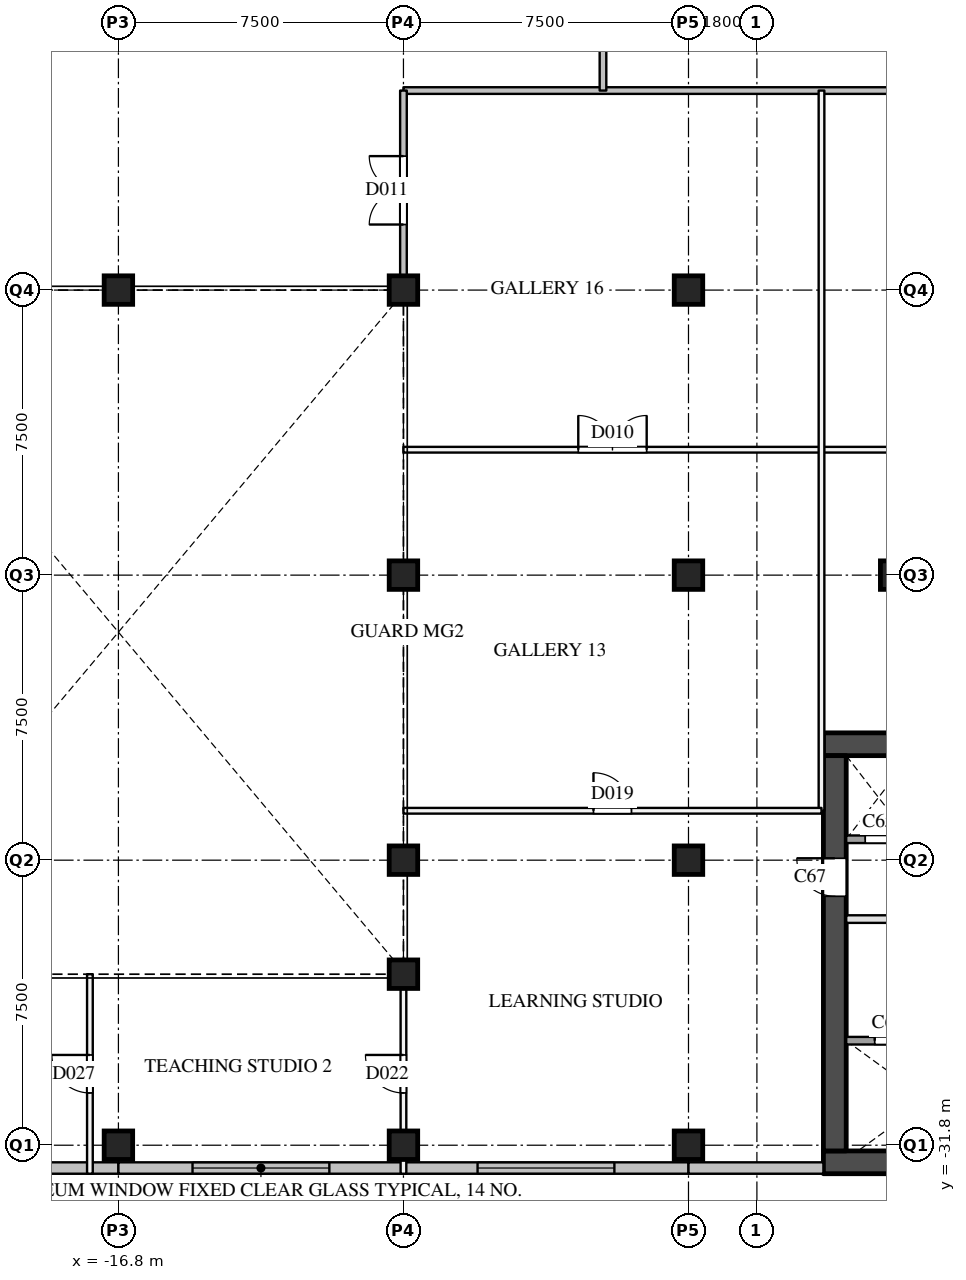
"""IFC4 building model, lengths in metres.
Left out: names, types, materials, properties, quantities, classifications, styles, units other than length and angle.
Written with IfcOpenShell. Run it as: python <this file> out.ifc"""

import sys

from ifc_helpers import new_model, si_unit, direction, frame, frame_2d, origin, origin_2d, place, context, subcontext, project, spatial, rectangle, extrude, element, fill, save


model = new_model("IFC4")
c1 = context("Model", 3, precision=1e-05, world=origin(), true_north=direction((0.0, 1.0)))
c2 = subcontext(c1, "Body", "Model", "MODEL_VIEW")
j1 = project(units=[si_unit("LENGTHUNIT", "METRE"), si_unit("PLANEANGLEUNIT", "RADIAN")], contexts=[c1])
p1 = place(None, origin())
s1 = spatial("IfcSite", under=j1, at=p1, CompositionType="ELEMENT")
p2 = place(p1, origin())
s2 = spatial("IfcBuilding", under=s1, at=p2, CompositionType="ELEMENT")
p3 = place(p2, frame((0.0, 0.0, 14.0)))
s3 = spatial("IfcBuildingStorey", under=s2, at=p3, CompositionType="ELEMENT", Elevation=14.0)
for number, where, z_axis, x_axis in (
    (1, (-16.8, -31.8, 0.0), (0.0, 0.0, 1.0), (1.0, 0.0, 0.0)),
    (2, (-16.8, -9.3, 0.0), (0.0, 0.0, 1.0), (1.0, 0.0, 0.0)),
    (3, (-9.3, -31.8, 0.0), (0.0, 0.0, 1.0), (1.0, 0.0, 0.0)),
    (4, (-9.3, -24.3, 0.0), (0.0, 0.0, 1.0), (1.0, 0.0, 0.0)),
    (5, (-9.3, -16.8, 0.0), (0.0, 0.0, 1.0), (1.0, 0.0, 0.0)),
    (6, (-9.3, -9.3, 0.0), (0.0, 0.0, 1.0), (1.0, 0.0, 0.0)),
    (7, (-1.8, -31.8, 0.0), (0.0, 0.0, 1.0), (1.0, 0.0, 0.0)),
):
    element("IfcColumn", number, at=place(p3, frame(where, z_axis=z_axis, x_axis=x_axis)), inside=s3, PredefinedType="COLUMN", context=c2, shape_type="SweptSolid", body=[
        extrude(rectangle(XDim=0.75, YDim=0.75, at=origin_2d()), origin(), (0.0, 0.0, 1.0), 7.0),
    ])
for number, where, z_axis, x_axis in (
    (8, (-1.8, -24.3, -0.41), (0.0, 0.0, 1.0), (1.0, 0.0, 0.0)),
    (9, (-1.8, -16.8, -0.41), (0.0, 0.0, 1.0), (1.0, 0.0, 0.0)),
    (10, (-1.8, -9.3, -0.41), (0.0, 0.0, 1.0), (1.0, 0.0, 0.0)),
):
    element("IfcColumn", number, at=place(p3, frame(where, z_axis=z_axis, x_axis=x_axis)), inside=s3, PredefinedType="COLUMN", context=c2, shape_type="SweptSolid", body=[
        extrude(rectangle(XDim=0.75, YDim=0.75, at=origin_2d()), origin(), (0.0, 0.0, 1.0), 7.41),
    ])
for number, where, z_axis, x_axis in (
    (11, (-9.3, -27.3, 0.0), (0.0, 0.0, 1.0), (1.0, 0.0, 0.0)),
    (12, (3.625, -16.8, 0.0), (0.0, 0.0, 1.0), (1.0, 0.0, 0.0)),
):
    element("IfcColumn", number, at=place(p3, frame(where, z_axis=z_axis, x_axis=x_axis)), inside=s3, PredefinedType="COLUMN", context=c2, shape_type="SweptSolid", body=[
        extrude(rectangle(XDim=0.75, YDim=0.75, at=origin_2d()), origin(), (0.0, 0.0, 1.0), 7.0),
    ])
p4 = place(p3, frame((-20.35, -32.4, 0.0), z_axis=(0.0, 0.0, 1.0), x_axis=(1.0, 0.0, 0.0)))
e13 = element("IfcWall", 13, at=p4, inside=s3, PredefinedType="SOLIDWALL", context=c2, shape_type="SweptSolid", body=[
    extrude(rectangle(XDim=3.55, YDim=0.3, at=frame_2d((1.775, 0.0))), origin(), (0.0, 0.0, 1.0), 6.59),
])
p5 = place(p3, frame((-16.8, -32.4, 0.0), z_axis=(0.0, 0.0, 1.0), x_axis=(1.0, 0.0, 0.0)))
e14 = element("IfcWall", 14, at=p5, inside=s3, PredefinedType="SOLIDWALL", context=c2, shape_type="SweptSolid", body=[
    extrude(rectangle(XDim=7.5, YDim=0.3, at=frame_2d((3.75, 0.0))), origin(), (0.0, 0.0, 1.0), 6.59),
])
p6 = place(p5, frame((1.95, 0.0, 0.9)))
e15 = element("IfcOpeningElement", 15, at=p6, cuts=e14, PredefinedType="OPENING", context=c2, shape_type="SweptSolid", body=[
    extrude(rectangle(XDim=3.6, YDim=3.0, at=frame_2d((1.8, 1.5))), frame((0.0, 0.16, 0.0), z_axis=(0.0, -1.0, 0.0), x_axis=(1.0, 0.0, 0.0)), (0.0, 0.0, 1.0), 0.32),
])
p7 = place(p3, frame((-9.3, -32.4, 0.0), z_axis=(0.0, 0.0, 1.0), x_axis=(1.0, 0.0, 0.0)))
e16 = element("IfcWall", 16, at=p7, inside=s3, PredefinedType="SOLIDWALL", context=c2, shape_type="SweptSolid", body=[
    extrude(rectangle(XDim=7.5, YDim=0.3, at=frame_2d((3.75, 0.0))), origin(), (0.0, 0.0, 1.0), 6.59),
])
p8 = place(p7, frame((1.95, 0.0, 0.9)))
e17 = element("IfcOpeningElement", 17, at=p8, cuts=e16, PredefinedType="OPENING", context=c2, shape_type="SweptSolid", body=[
    extrude(rectangle(XDim=3.6, YDim=3.0, at=frame_2d((1.8, 1.5))), frame((0.0, 0.16, 0.0), z_axis=(0.0, -1.0, 0.0), x_axis=(1.0, 0.0, 0.0)), (0.0, 0.0, 1.0), 0.32),
])
p9 = place(p3, frame((-1.8, -32.4, 0.0), z_axis=(0.0, 0.0, 1.0), x_axis=(1.0, 0.0, 0.0)))
e18 = element("IfcWall", 18, at=p9, inside=s3, PredefinedType="SOLIDWALL", context=c2, shape_type="SweptSolid", body=[
    extrude(rectangle(XDim=3.55, YDim=0.3, at=frame_2d((1.775, 0.0))), origin(), (0.0, 0.0, 1.0), 6.59),
])
for number, where, z_axis, x_axis in (
    (19, (1.75, -32.25, 0.0), (0.0, 0.0, 1.0), (1.0, 0.0, 0.0)),
    (20, (1.75, -21.25, 0.0), (0.0, 0.0, 1.0), (1.0, 0.0, 0.0)),
):
    element("IfcWall", number, at=place(p3, frame(where, z_axis=z_axis, x_axis=x_axis)), inside=s3, PredefinedType="SHEAR", context=c2, shape_type="SweptSolid", body=[
        extrude(rectangle(XDim=12.2, YDim=0.6, at=frame_2d((6.1, 0.0))), origin(), (0.0, 0.0, 1.0), 6.59),
    ])
p10 = place(p3, frame((2.05, -31.95, 0.0), z_axis=(0.0, 0.0, 1.0), x_axis=(0.0, 1.0, 0.0)))
e21 = element("IfcWall", 21, at=p10, inside=s3, PredefinedType="SHEAR", context=c2, shape_type="SweptSolid", body=[
    extrude(rectangle(XDim=10.4, YDim=0.6, at=frame_2d((5.2, 0.0))), origin(), (0.0, 0.0, 1.0), 6.59),
])
p11 = place(p10, frame((6.7, 0.0, 0.0)))
e22 = element("IfcOpeningElement", 22, at=p11, cuts=e21, PredefinedType="OPENING", context=c2, shape_type="SweptSolid", body=[
    extrude(rectangle(XDim=1.0, YDim=2.1, at=frame_2d((0.5, 1.05))), frame((0.0, 0.31, 0.0), z_axis=(0.0, -1.0, 0.0), x_axis=(1.0, 0.0, 0.0)), (0.0, 0.0, 1.0), 0.62),
])
p12 = place(p3, frame((2.35, -29.05, 0.0), z_axis=(0.0, 0.0, 1.0), x_axis=(1.0, 0.0, 0.0)))
e23 = element("IfcWall", 23, at=p12, inside=s3, PredefinedType="SOLIDWALL", context=c2, shape_type="SweptSolid", body=[
    extrude(rectangle(XDim=4.3, YDim=0.2, at=frame_2d((2.15, 0.0))), origin(), (0.0, 0.0, 1.0), 6.59),
])
p13 = place(p12, frame((2.65, 0.0, 0.0)))
e24 = element("IfcOpeningElement", 24, at=p13, cuts=e23, PredefinedType="OPENING", context=c2, shape_type="SweptSolid", body=[
    extrude(rectangle(XDim=1.2, YDim=2.1, at=frame_2d((0.6, 1.05))), frame((0.0, 0.11, 0.0), z_axis=(0.0, -1.0, 0.0), x_axis=(1.0, 0.0, 0.0)), (0.0, 0.0, 1.0), 0.22),
])
p14 = place(p12, frame((0.75, 0.0, 0.0)))
e25 = element("IfcOpeningElement", 25, at=p14, cuts=e23, PredefinedType="OPENING", context=c2, shape_type="SweptSolid", body=[
    extrude(rectangle(XDim=0.7, YDim=2.1, at=frame_2d((0.35, 1.05))), frame((0.0, 0.11, 0.0), z_axis=(0.0, -1.0, 0.0), x_axis=(1.0, 0.0, 0.0)), (0.0, 0.0, 1.0), 0.22),
])
p15 = place(p3, frame((2.35, -25.85, 0.0), z_axis=(0.0, 0.0, 1.0), x_axis=(1.0, 0.0, 0.0)))
e26 = element("IfcWall", 26, at=p15, inside=s3, PredefinedType="PARTITIONING", context=c2, shape_type="SweptSolid", body=[
    extrude(rectangle(XDim=4.3, YDim=0.2, at=frame_2d((2.15, 0.0))), origin(), (0.0, 0.0, 1.0), 6.59),
])
p16 = place(p15, frame((1.15, 0.0, 0.0)))
e27 = element("IfcOpeningElement", 27, at=p16, cuts=e26, PredefinedType="OPENING", context=c2, shape_type="SweptSolid", body=[
    extrude(rectangle(XDim=1.8, YDim=2.1, at=frame_2d((0.9, 1.05))), frame((0.0, 0.11, 0.0), z_axis=(0.0, -1.0, 0.0), x_axis=(1.0, 0.0, 0.0)), (0.0, 0.0, 1.0), 0.22),
])
p17 = place(p3, frame((2.35, -23.75, 0.0), z_axis=(0.0, 0.0, 1.0), x_axis=(1.0, 0.0, 0.0)))
e28 = element("IfcWall", 28, at=p17, inside=s3, PredefinedType="SOLIDWALL", context=c2, shape_type="SweptSolid", body=[
    extrude(rectangle(XDim=1.7, YDim=0.2, at=frame_2d((0.85, 0.0))), origin(), (0.0, 0.0, 1.0), 6.59),
])
p18 = place(p17, frame((0.5, 0.0, 0.0)))
e29 = element("IfcOpeningElement", 29, at=p18, cuts=e28, PredefinedType="OPENING", context=c2, shape_type="SweptSolid", body=[
    extrude(rectangle(XDim=0.7, YDim=2.1, at=frame_2d((0.35, 1.05))), frame((0.0, 0.11, 0.0), z_axis=(0.0, -1.0, 0.0), x_axis=(1.0, 0.0, 0.0)), (0.0, 0.0, 1.0), 0.22),
])
p19 = place(p3, frame((-9.3, -4.05, 0.0), z_axis=(0.0, 0.0, 1.0), x_axis=(1.0, 0.0, 0.0)))
e30 = element("IfcWall", 30, at=p19, inside=s3, PredefinedType="PARTITIONING", context=c2, shape_type="SweptSolid", body=[
    extrude(rectangle(XDim=23.25, YDim=0.175, at=frame_2d((11.625, 0.0))), origin(), (0.0, 0.0, 1.0), 5.79),
])
p20 = place(p19, frame((16.225, 0.0, 0.0)))
e31 = element("IfcOpeningElement", 31, at=p20, cuts=e30, PredefinedType="OPENING", context=c2, shape_type="SweptSolid", body=[
    extrude(rectangle(XDim=1.8, YDim=2.1, at=frame_2d((0.9, 1.05))), frame((0.0, 0.097, 0.0), z_axis=(0.0, -1.0, 0.0), x_axis=(1.0, 0.0, 0.0)), (0.0, 0.0, 1.0), 0.195),
])
p21 = place(p3, frame((-9.3, -9.3, 0.0), z_axis=(0.0, 0.0, 1.0), x_axis=(0.0, 1.0, 0.0)))
e32 = element("IfcWall", 32, at=p21, inside=s3, PredefinedType="PARTITIONING", context=c2, shape_type="SweptSolid", body=[
    extrude(rectangle(XDim=5.25, YDim=0.175, at=frame_2d((2.625, 0.0))), origin(), (0.0, 0.0, 1.0), 5.79),
])
p22 = place(p21, frame((1.725, 0.0, 0.0)))
e33 = element("IfcOpeningElement", 33, at=p22, cuts=e32, PredefinedType="OPENING", context=c2, shape_type="SweptSolid", body=[
    extrude(rectangle(XDim=1.8, YDim=2.1, at=frame_2d((0.9, 1.05))), frame((0.0, 0.097, 0.0), z_axis=(0.0, -1.0, 0.0), x_axis=(1.0, 0.0, 0.0)), (0.0, 0.0, 1.0), 0.195),
])
p23 = place(p3, frame((-4.05, -4.05, 0.0), z_axis=(0.0, 0.0, 1.0), x_axis=(0.0, 1.0, 0.0)))
e34 = element("IfcWall", 34, at=p23, inside=s3, PredefinedType="PARTITIONING", context=c2, shape_type="SweptSolid", body=[
    extrude(rectangle(XDim=63.0, YDim=0.175, at=frame_2d((31.5, 0.0))), origin(), (0.0, 0.0, 1.0), 5.79),
])
p24 = place(p23, frame((7.125, 0.0, 0.0)))
e35 = element("IfcOpeningElement", 35, at=p24, cuts=e34, PredefinedType="OPENING", context=c2, shape_type="SweptSolid", body=[
    extrude(rectangle(XDim=1.8, YDim=2.1, at=frame_2d((0.9, 1.05))), frame((0.0, 0.097, 0.0), z_axis=(0.0, -1.0, 0.0), x_axis=(1.0, 0.0, 0.0)), (0.0, 0.0, 1.0), 0.195),
])
p25 = place(p3, frame((1.7, -23.0, 0.0), z_axis=(0.0, 0.0, 1.0), x_axis=(1.0, 0.0, 0.0)))
e36 = element("IfcWall", 36, at=p25, inside=s3, PredefinedType="PARTITIONING", context=c2, shape_type="SweptSolid", body=[
    extrude(rectangle(XDim=0.05, YDim=0.15, at=frame_2d((0.025, 0.0))), origin(), (0.0, 0.0, 1.0), 6.59),
])
p26 = place(p3, frame((-9.3, -13.5, 0.0), z_axis=(0.0, 0.0, 1.0), x_axis=(1.0, 0.0, 0.0)))
e37 = element("IfcWall", 37, at=p26, inside=s3, PredefinedType="PARTITIONING", context=c2, shape_type="SweptSolid", body=[
    extrude(rectangle(XDim=23.25, YDim=0.15, at=frame_2d((11.625, 0.0))), origin(), (0.0, 0.0, 1.0), 5.79),
])
p27 = place(p26, frame((16.225, 0.0, 0.0)))
e38 = element("IfcOpeningElement", 38, at=p27, cuts=e37, PredefinedType="OPENING", context=c2, shape_type="SweptSolid", body=[
    extrude(rectangle(XDim=1.8, YDim=2.1, at=frame_2d((0.9, 1.05))), frame((0.0, 0.085, 0.0), z_axis=(0.0, -1.0, 0.0), x_axis=(1.0, 0.0, 0.0)), (0.0, 0.0, 1.0), 0.17),
])
p28 = place(p26, frame((4.6, 0.0, 0.0)))
e39 = element("IfcOpeningElement", 39, at=p28, cuts=e37, PredefinedType="OPENING", context=c2, shape_type="SweptSolid", body=[
    extrude(rectangle(XDim=1.8, YDim=2.1, at=frame_2d((0.9, 1.05))), frame((0.0, 0.085, 0.0), z_axis=(0.0, -1.0, 0.0), x_axis=(1.0, 0.0, 0.0)), (0.0, 0.0, 1.0), 0.17),
])
p29 = place(p3, frame((1.7, -23.0, 0.0), z_axis=(0.0, 0.0, 1.0), x_axis=(0.0, 1.0, 0.0)))
e40 = element("IfcWall", 40, at=p29, inside=s3, PredefinedType="PARTITIONING", context=c2, shape_type="SweptSolid", body=[
    extrude(rectangle(XDim=18.95, YDim=0.15, at=frame_2d((9.475, 0.0))), origin(), (0.0, 0.0, 1.0), 5.79),
])
p30 = place(p3, frame((-9.3, -23.0, 0.0), z_axis=(0.0, 0.0, 1.0), x_axis=(1.0, 0.0, 0.0)))
e41 = element("IfcWall", 41, at=p30, inside=s3, PredefinedType="PARTITIONING", context=c2, shape_type="SweptSolid", body=[
    extrude(rectangle(XDim=11.0, YDim=0.15, at=frame_2d((5.5, 0.0))), origin(), (0.0, 0.0, 1.0), 5.79),
])
p31 = place(p30, frame((5.0, 0.0, 0.0)))
e42 = element("IfcOpeningElement", 42, at=p31, cuts=e41, PredefinedType="OPENING", context=c2, shape_type="SweptSolid", body=[
    extrude(rectangle(XDim=1.0, YDim=2.1, at=frame_2d((0.5, 1.05))), frame((0.0, 0.085, 0.0), z_axis=(0.0, -1.0, 0.0), x_axis=(1.0, 0.0, 0.0)), (0.0, 0.0, 1.0), 0.17),
])
p32 = place(p3, frame((-17.55, -32.55, 0.0), z_axis=(0.0, 0.0, 1.0), x_axis=(0.0, 1.0, 0.0)))
e43 = element("IfcWall", 43, at=p32, inside=s3, PredefinedType="PARTITIONING", context=c2, shape_type="SweptSolid", body=[
    extrude(rectangle(XDim=5.25, YDim=0.15, at=frame_2d((2.625, 0.0))), origin(), (0.0, 0.0, 1.0), 6.59),
])
p33 = place(p32, frame((2.125, 0.0, 0.0)))
e44 = element("IfcOpeningElement", 44, at=p33, cuts=e43, PredefinedType="OPENING", context=c2, shape_type="SweptSolid", body=[
    extrude(rectangle(XDim=1.0, YDim=2.1, at=frame_2d((0.5, 1.05))), frame((0.0, 0.085, 0.0), z_axis=(0.0, -1.0, 0.0), x_axis=(1.0, 0.0, 0.0)), (0.0, 0.0, 1.0), 0.17),
])
p34 = place(p3, frame((-9.3, -32.55, 0.0), z_axis=(0.0, 0.0, 1.0), x_axis=(0.0, 1.0, 0.0)))
e45 = element("IfcWall", 45, at=p34, inside=s3, PredefinedType="PARTITIONING", context=c2, shape_type="SweptSolid", body=[
    extrude(rectangle(XDim=5.25, YDim=0.15, at=frame_2d((2.625, 0.0))), origin(), (0.0, 0.0, 1.0), 5.79),
])
p35 = place(p34, frame((2.125, 0.0, 0.0)))
e46 = element("IfcOpeningElement", 46, at=p35, cuts=e45, PredefinedType="OPENING", context=c2, shape_type="SweptSolid", body=[
    extrude(rectangle(XDim=1.0, YDim=2.1, at=frame_2d((0.5, 1.05))), frame((0.0, 0.085, 0.0), z_axis=(0.0, -1.0, 0.0), x_axis=(1.0, 0.0, 0.0)), (0.0, 0.0, 1.0), 0.17),
])
p36 = place(p6, origin())
e47 = element("IfcWindow", 47, at=p36, inside=s3, PartitioningType="SINGLE_PANEL", PredefinedType="WINDOW", context=c2, shape_type="SweptSolid", body=[
    extrude(rectangle(XDim=3.6, YDim=3.0, at=frame_2d((1.8, 1.5))), frame((0.0, 0.03, 0.0), z_axis=(0.0, -1.0, 0.0), x_axis=(1.0, 0.0, 0.0)), (0.0, 0.0, 1.0), 0.06),
])
fill(e15, e47)
p37 = place(p8, origin())
e48 = element("IfcWindow", 48, at=p37, inside=s3, PartitioningType="SINGLE_PANEL", PredefinedType="WINDOW", context=c2, shape_type="SweptSolid", body=[
    extrude(rectangle(XDim=3.6, YDim=3.0, at=frame_2d((1.8, 1.5))), frame((0.0, 0.03, 0.0), z_axis=(0.0, -1.0, 0.0), x_axis=(1.0, 0.0, 0.0)), (0.0, 0.0, 1.0), 0.06),
])
fill(e17, e48)
p38 = place(p18, origin())
e49 = element("IfcDoor", 49, at=p38, inside=s3, OperationType="SINGLE_SWING_RIGHT", PredefinedType="DOOR", context=c2, shape_type="SweptSolid", body=[
    extrude(rectangle(XDim=0.7, YDim=2.1, at=frame_2d((0.35, 1.05))), frame((0.0, 0.025, 0.0), z_axis=(0.0, -1.0, 0.0), x_axis=(1.0, 0.0, 0.0)), (0.0, 0.0, 1.0), 0.05),
])
fill(e29, e49)
p39 = place(p14, origin())
e50 = element("IfcDoor", 50, at=p39, inside=s3, OperationType="SINGLE_SWING_LEFT", PredefinedType="DOOR", context=c2, shape_type="SweptSolid", body=[
    extrude(rectangle(XDim=0.7, YDim=2.1, at=frame_2d((0.35, 1.05))), frame((0.0, 0.025, 0.0), z_axis=(0.0, -1.0, 0.0), x_axis=(1.0, 0.0, 0.0)), (0.0, 0.0, 1.0), 0.05),
])
fill(e25, e50)
p40 = place(p11, origin())
e51 = element("IfcDoor", 51, at=p40, inside=s3, OperationType="SINGLE_SWING_RIGHT", PredefinedType="DOOR", context=c2, shape_type="SweptSolid", body=[
    extrude(rectangle(XDim=1.0, YDim=2.1, at=frame_2d((0.5, 1.05))), frame((0.0, 0.025, 0.0), z_axis=(0.0, -1.0, 0.0), x_axis=(1.0, 0.0, 0.0)), (0.0, 0.0, 1.0), 0.05),
])
fill(e22, e51)
p41 = place(p28, origin())
e52 = element("IfcDoor", 52, at=p41, inside=s3, OperationType="DOUBLE_DOOR_SINGLE_SWING", PredefinedType="DOOR", context=c2, shape_type="SweptSolid", body=[
    extrude(rectangle(XDim=1.8, YDim=2.1, at=frame_2d((0.9, 1.05))), frame((0.0, 0.025, 0.0), z_axis=(0.0, -1.0, 0.0), x_axis=(1.0, 0.0, 0.0)), (0.0, 0.0, 1.0), 0.05),
])
fill(e39, e52)
p42 = place(p22, origin())
e53 = element("IfcDoor", 53, at=p42, inside=s3, OperationType="DOUBLE_DOOR_SINGLE_SWING", PredefinedType="DOOR", context=c2, shape_type="SweptSolid", body=[
    extrude(rectangle(XDim=1.8, YDim=2.1, at=frame_2d((0.9, 1.05))), frame((0.0, 0.025, 0.0), z_axis=(0.0, -1.0, 0.0), x_axis=(1.0, 0.0, 0.0)), (0.0, 0.0, 1.0), 0.05),
])
fill(e33, e53)
p43 = place(p31, origin())
e54 = element("IfcDoor", 54, at=p43, inside=s3, OperationType="SINGLE_SWING_LEFT", PredefinedType="DOOR", context=c2, shape_type="SweptSolid", body=[
    extrude(rectangle(XDim=1.0, YDim=2.1, at=frame_2d((0.5, 1.05))), frame((0.0, 0.025, 0.0), z_axis=(0.0, -1.0, 0.0), x_axis=(1.0, 0.0, 0.0)), (0.0, 0.0, 1.0), 0.05),
])
fill(e42, e54)
p44 = place(p35, origin())
e55 = element("IfcDoor", 55, at=p44, inside=s3, OperationType="SINGLE_SWING_RIGHT", PredefinedType="DOOR", context=c2, shape_type="SweptSolid", body=[
    extrude(rectangle(XDim=1.0, YDim=2.1, at=frame_2d((0.5, 1.05))), frame((0.0, 0.025, 0.0), z_axis=(0.0, -1.0, 0.0), x_axis=(1.0, 0.0, 0.0)), (0.0, 0.0, 1.0), 0.05),
])
fill(e46, e55)
p45 = place(p33, origin())
e56 = element("IfcDoor", 56, at=p45, inside=s3, OperationType="SINGLE_SWING_RIGHT", PredefinedType="DOOR", context=c2, shape_type="SweptSolid", body=[
    extrude(rectangle(XDim=1.0, YDim=2.1, at=frame_2d((0.5, 1.05))), frame((0.0, 0.025, 0.0), z_axis=(0.0, -1.0, 0.0), x_axis=(1.0, 0.0, 0.0)), (0.0, 0.0, 1.0), 0.05),
])
fill(e44, e56)
save(model, sys.argv[1])
